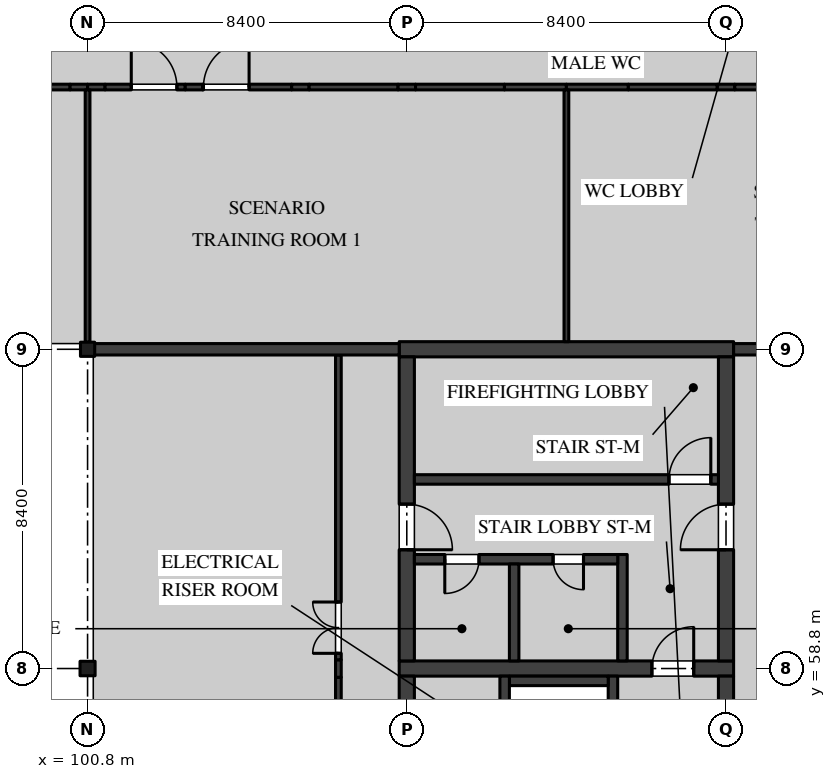
"""IFC4 building model, lengths in metres.
Left out: names, types, materials, properties, quantities, classifications, styles, units other than length and angle.
Written with IfcOpenShell. Run it as: python <this file> out.ifc"""

import sys

from ifc_helpers import new_model, si_unit, direction, frame, frame_2d, origin, origin_2d, place, context, subcontext, project, spatial, rectangle, i_section, extrude, element, fill, save


model = new_model("IFC4")
c1 = context("Model", 3, precision=1e-05, world=origin(), true_north=direction((0.0, 1.0)))
c2 = subcontext(c1, "Body", "Model", "MODEL_VIEW")
j1 = project(units=[si_unit("LENGTHUNIT", "METRE"), si_unit("PLANEANGLEUNIT", "RADIAN")], contexts=[c1])
p1 = place(None, origin())
s1 = spatial("IfcSite", under=j1, at=p1, CompositionType="ELEMENT")
p2 = place(p1, origin())
s2 = spatial("IfcBuilding", under=s1, at=p2, CompositionType="ELEMENT")
p3 = place(p2, frame((0.0, 0.0, 14.4)))
s3 = spatial("IfcBuildingStorey", under=s2, at=p3, CompositionType="ELEMENT", Elevation=14.4)
p4 = place(p3, frame((100.8, 58.8, 0.0), z_axis=(0.0, 0.0, 1.0), x_axis=(1.0, 0.0, 0.0)))
e1 = element("IfcColumn", 1, at=p4, inside=s3, PredefinedType="COLUMN", context=c2, shape_type="SweptSolid", body=[
    extrude(i_section(OverallWidth=0.396, OverallDepth=0.381, WebThickness=0.019, FlangeThickness=0.03, FilletRadius=0.015, at=origin_2d()), origin(), (0.0, 0.0, 1.0), 4.37),
])
p5 = place(p3, frame((100.8, 67.2, 0.0), z_axis=(0.0, 0.0, 1.0), x_axis=(1.0, 0.0, 0.0)))
e2 = element("IfcColumn", 2, at=p5, inside=s3, PredefinedType="COLUMN", context=c2, shape_type="SweptSolid", body=[
    extrude(i_section(OverallWidth=0.373, OverallDepth=0.373, WebThickness=0.016, FlangeThickness=0.026, FilletRadius=0.015, at=origin_2d()), origin(), (0.0, 0.0, 1.0), 4.37),
])
p6 = place(p3, frame((109.0, 58.8, 0.0), z_axis=(0.0, 0.0, 1.0), x_axis=(1.0, 0.0, 0.0)))
e3 = element("IfcWall", 3, at=p6, inside=s3, PredefinedType="SHEAR", context=c2, shape_type="SweptSolid", body=[
    extrude(rectangle(XDim=8.8, YDim=0.4, at=frame_2d((4.4, 0.0))), origin(), (0.0, 0.0, 1.0), 4.37),
])
p7 = place(p6, frame((6.65, 0.0, 0.0)))
e4 = element("IfcOpeningElement", 4, at=p7, cuts=e3, PredefinedType="OPENING", context=c2, shape_type="SweptSolid", body=[
    extrude(rectangle(XDim=1.1, YDim=2.1, at=frame_2d((0.55, 1.05))), frame((0.0, 0.21, 0.0), z_axis=(0.0, -1.0, 0.0), x_axis=(1.0, 0.0, 0.0)), (0.0, 0.0, 1.0), 0.42),
])
p8 = place(p3, frame((109.2, 50.6, 0.0), z_axis=(0.0, 0.0, 1.0), x_axis=(0.0, 1.0, 0.0)))
e5 = element("IfcWall", 5, at=p8, inside=s3, PredefinedType="SHEAR", context=c2, shape_type="SweptSolid", body=[
    extrude(rectangle(XDim=8.0, YDim=0.4, at=frame_2d((4.0, 0.0))), origin(), (0.0, 0.0, 1.0), 4.37),
])
p9 = place(p8, frame((3.25, 0.0, 0.0)))
e6 = element("IfcOpeningElement", 6, at=p9, cuts=e5, PredefinedType="OPENING", context=c2, shape_type="SweptSolid", body=[
    extrude(rectangle(XDim=1.2, YDim=2.1, at=frame_2d((0.6, 1.05))), frame((0.0, 0.21, 0.0), z_axis=(0.0, -1.0, 0.0), x_axis=(1.0, 0.0, 0.0)), (0.0, 0.0, 1.0), 0.42),
])
p10 = place(p3, frame((117.6, 50.6, 0.0), z_axis=(0.0, 0.0, 1.0), x_axis=(0.0, 1.0, 0.0)))
e7 = element("IfcWall", 7, at=p10, inside=s3, PredefinedType="SHEAR", context=c2, shape_type="SweptSolid", body=[
    extrude(rectangle(XDim=8.0, YDim=0.4, at=frame_2d((4.0, 0.0))), origin(), (0.0, 0.0, 1.0), 4.37),
])
p11 = place(p10, frame((3.25, 0.0, 0.0)))
e8 = element("IfcOpeningElement", 8, at=p11, cuts=e7, PredefinedType="OPENING", context=c2, shape_type="SweptSolid", body=[
    extrude(rectangle(XDim=1.2, YDim=2.1, at=frame_2d((0.6, 1.05))), frame((0.0, 0.21, 0.0), z_axis=(0.0, -1.0, 0.0), x_axis=(1.0, 0.0, 0.0)), (0.0, 0.0, 1.0), 0.42),
])
p12 = place(p10, frame((6.0, 0.0, 0.0)))
e9 = element("IfcOpeningElement", 9, at=p12, cuts=e7, PredefinedType="OPENING", context=c2, shape_type="SweptSolid", body=[
    extrude(rectangle(XDim=1.2, YDim=2.1, at=frame_2d((0.6, 1.05))), frame((0.0, 0.21, 0.0), z_axis=(0.0, -1.0, 0.0), x_axis=(1.0, 0.0, 0.0)), (0.0, 0.0, 1.0), 0.42),
])
p13 = place(p3, frame((109.0, 67.2, 0.0), z_axis=(0.0, 0.0, 1.0), x_axis=(1.0, 0.0, 0.0)))
e10 = element("IfcWall", 10, at=p13, inside=s3, PredefinedType="SHEAR", context=c2, shape_type="SweptSolid", body=[
    extrude(rectangle(XDim=8.8, YDim=0.4, at=frame_2d((4.4, 0.0))), origin(), (0.0, 0.0, 1.0), 4.37),
])
p14 = place(p3, frame((109.2, 59.0, 0.0), z_axis=(0.0, 0.0, 1.0), x_axis=(0.0, 1.0, 0.0)))
e11 = element("IfcWall", 11, at=p14, inside=s3, PredefinedType="SHEAR", context=c2, shape_type="SweptSolid", body=[
    extrude(rectangle(XDim=8.0, YDim=0.4, at=frame_2d((4.0, 0.0))), origin(), (0.0, 0.0, 1.0), 4.37),
])
p15 = place(p14, frame((2.925, 0.0, 0.0)))
e12 = element("IfcOpeningElement", 12, at=p15, cuts=e11, PredefinedType="OPENING", context=c2, shape_type="SweptSolid", body=[
    extrude(rectangle(XDim=1.2, YDim=2.1, at=frame_2d((0.6, 1.05))), frame((0.0, 0.21, 0.0), z_axis=(0.0, -1.0, 0.0), x_axis=(1.0, 0.0, 0.0)), (0.0, 0.0, 1.0), 0.42),
])
p16 = place(p3, frame((117.6, 59.0, 0.0), z_axis=(0.0, 0.0, 1.0), x_axis=(0.0, 1.0, 0.0)))
e13 = element("IfcWall", 13, at=p16, inside=s3, PredefinedType="SHEAR", context=c2, shape_type="SweptSolid", body=[
    extrude(rectangle(XDim=8.0, YDim=0.4, at=frame_2d((4.0, 0.0))), origin(), (0.0, 0.0, 1.0), 4.37),
])
p17 = place(p16, frame((2.925, 0.0, 0.0)))
e14 = element("IfcOpeningElement", 14, at=p17, cuts=e13, PredefinedType="OPENING", context=c2, shape_type="SweptSolid", body=[
    extrude(rectangle(XDim=1.2, YDim=2.1, at=frame_2d((0.6, 1.05))), frame((0.0, 0.21, 0.0), z_axis=(0.0, -1.0, 0.0), x_axis=(1.0, 0.0, 0.0)), (0.0, 0.0, 1.0), 0.42),
])
p18 = place(p3, frame((117.4, 63.775, 0.0), z_axis=(0.0, 0.0, 1.0), x_axis=(-1.0, 0.0, 0.0)))
e15 = element("IfcWall", 15, at=p18, inside=s3, PredefinedType="SOLIDWALL", context=c2, shape_type="SweptSolid", body=[
    extrude(rectangle(XDim=8.0, YDim=0.25, at=frame_2d((4.0, 0.0))), origin(), (0.0, 0.0, 1.0), 4.37),
])
p19 = place(p18, frame((0.2, 0.0, 0.0)))
e16 = element("IfcOpeningElement", 16, at=p19, cuts=e15, PredefinedType="OPENING", context=c2, shape_type="SweptSolid", body=[
    extrude(rectangle(XDim=1.1, YDim=2.1, at=frame_2d((0.55, 1.05))), frame((0.0, 0.135, 0.0), z_axis=(0.0, -1.0, 0.0), x_axis=(1.0, 0.0, 0.0)), (0.0, 0.0, 1.0), 0.27),
])
p20 = place(p3, frame((114.875, 61.8, 0.0), z_axis=(0.0, 0.0, 1.0), x_axis=(0.0, -1.0, 0.0)))
e17 = element("IfcWall", 17, at=p20, inside=s3, PredefinedType="SOLIDWALL", context=c2, shape_type="SweptSolid", body=[
    extrude(rectangle(XDim=2.8, YDim=0.25, at=frame_2d((1.4, 0.0))), origin(), (0.0, 0.0, 1.0), 4.37),
])
p21 = place(p3, frame((114.75, 61.675, 0.0), z_axis=(0.0, 0.0, 1.0), x_axis=(-1.0, 0.0, 0.0)))
e18 = element("IfcWall", 18, at=p21, inside=s3, PredefinedType="SOLIDWALL", context=c2, shape_type="SweptSolid", body=[
    extrude(rectangle(XDim=5.35, YDim=0.25, at=frame_2d((2.675, 0.0))), origin(), (0.0, 0.0, 1.0), 4.37),
])
p22 = place(p21, frame((3.65, 0.0, 0.0)))
e19 = element("IfcOpeningElement", 19, at=p22, cuts=e18, PredefinedType="OPENING", context=c2, shape_type="SweptSolid", body=[
    extrude(rectangle(XDim=0.9, YDim=2.1, at=frame_2d((0.45, 1.05))), frame((0.0, 0.135, 0.0), z_axis=(0.0, -1.0, 0.0), x_axis=(1.0, 0.0, 0.0)), (0.0, 0.0, 1.0), 0.27),
])
p23 = place(p21, frame((0.9, 0.0, 0.0)))
e20 = element("IfcOpeningElement", 20, at=p23, cuts=e18, PredefinedType="OPENING", context=c2, shape_type="SweptSolid", body=[
    extrude(rectangle(XDim=0.8, YDim=2.1, at=frame_2d((0.4, 1.05))), frame((0.0, 0.135, 0.0), z_axis=(0.0, -1.0, 0.0), x_axis=(1.0, 0.0, 0.0)), (0.0, 0.0, 1.0), 0.27),
])
p24 = place(p3, frame((112.025, 61.55, 0.0), z_axis=(0.0, 0.0, 1.0), x_axis=(0.0, -1.0, 0.0)))
e21 = element("IfcWall", 21, at=p24, inside=s3, PredefinedType="SOLIDWALL", context=c2, shape_type="SweptSolid", body=[
    extrude(rectangle(XDim=2.55, YDim=0.25, at=frame_2d((1.275, 0.0))), origin(), (0.0, 0.0, 1.0), 4.37),
])
p25 = place(p3, frame((114.625, 55.5, 0.0), z_axis=(0.0, 0.0, 1.0), x_axis=(0.0, 1.0, 0.0)))
e22 = element("IfcWall", 22, at=p25, inside=s3, PredefinedType="SOLIDWALL", context=c2, shape_type="SweptSolid", body=[
    extrude(rectangle(XDim=3.1, YDim=0.25, at=frame_2d((1.55, 0.0))), origin(), (0.0, 0.0, 1.0), 4.37),
])
p26 = place(p25, frame((1.0, 0.0, 0.0)))
e23 = element("IfcOpeningElement", 23, at=p26, cuts=e22, PredefinedType="OPENING", context=c2, shape_type="SweptSolid", body=[
    extrude(rectangle(XDim=1.1, YDim=2.1, at=frame_2d((0.55, 1.05))), frame((0.0, 0.135, 0.0), z_axis=(0.0, -1.0, 0.0), x_axis=(1.0, 0.0, 0.0)), (0.0, 0.0, 1.0), 0.27),
])
p27 = place(p3, frame((111.9, 58.475, 0.0), z_axis=(0.0, 0.0, 1.0), x_axis=(1.0, 0.0, 0.0)))
e24 = element("IfcWall", 24, at=p27, inside=s3, PredefinedType="SOLIDWALL", context=c2, shape_type="SweptSolid", body=[
    extrude(rectangle(XDim=2.6, YDim=0.25, at=frame_2d((1.3, 0.0))), origin(), (0.0, 0.0, 1.0), 4.37),
])
p28 = place(p3, frame((111.775, 55.5, 0.0), z_axis=(0.0, 0.0, 1.0), x_axis=(0.0, 1.0, 0.0)))
e25 = element("IfcWall", 25, at=p28, inside=s3, PredefinedType="SOLIDWALL", context=c2, shape_type="SweptSolid", body=[
    extrude(rectangle(XDim=3.1, YDim=0.25, at=frame_2d((1.55, 0.0))), origin(), (0.0, 0.0, 1.0), 4.37),
])
p29 = place(p3, frame((107.4, 50.86, 0.0), z_axis=(0.0, 0.0, 1.0), x_axis=(0.0, 1.0, 0.0)))
e26 = element("IfcWall", 26, at=p29, inside=s3, PredefinedType="PARTITIONING", context=c2, shape_type="SweptSolid", body=[
    extrude(rectangle(XDim=7.71, YDim=0.15, at=frame_2d((3.855, 0.0))), origin(), (0.0, 0.0, 1.0), 4.37),
])
p30 = place(p3, frame((107.4, 58.57, 0.0), z_axis=(0.0, 0.0, 1.0), x_axis=(0.0, 1.0, 0.0)))
e27 = element("IfcWall", 27, at=p30, inside=s3, PredefinedType="PARTITIONING", context=c2, shape_type="SweptSolid", body=[
    extrude(rectangle(XDim=0.46, YDim=0.15, at=frame_2d((0.23, 0.0))), origin(), (0.0, 0.0, 1.0), 3.746),
])
p31 = place(p3, frame((107.4, 59.03, 0.0), z_axis=(0.0, 0.0, 1.0), x_axis=(0.0, 1.0, 0.0)))
e28 = element("IfcWall", 28, at=p31, inside=s3, PredefinedType="PARTITIONING", context=c2, shape_type="SweptSolid", body=[
    extrude(rectangle(XDim=8.02, YDim=0.15, at=frame_2d((4.01, 0.0))), origin(), (0.0, 0.0, 1.0), 4.37),
])
p32 = place(p31, frame((0.17, 0.0, 0.0)))
e29 = element("IfcOpeningElement", 29, at=p32, cuts=e28, PredefinedType="OPENING", context=c2, shape_type="SweptSolid", body=[
    extrude(rectangle(XDim=1.35, YDim=2.1, at=frame_2d((0.675, 1.05))), frame((0.0, 0.085, 0.0), z_axis=(0.0, -1.0, 0.0), x_axis=(1.0, 0.0, 0.0)), (0.0, 0.0, 1.0), 0.17),
])
p33 = place(p3, frame((98.23, 74.1, 0.0), z_axis=(0.0, 0.0, 1.0), x_axis=(1.0, 0.0, 0.0)))
e30 = element("IfcWall", 30, at=p33, inside=s3, PredefinedType="PARTITIONING", context=c2, shape_type="SweptSolid", body=[
    extrude(rectangle(XDim=2.11, YDim=0.15, at=frame_2d((1.055, 0.0))), origin(), (0.0, 0.0, 1.0), 4.37),
])
for number, where, z_axis, x_axis in (
    (31, (100.34, 74.1, 0.0), (0.0, 0.0, 1.0), (1.0, 0.0, 0.0)),
    (32, (100.8, 74.1, 0.0), (0.0, 0.0, 1.0), (1.0, 0.0, 0.0)),
):
    element("IfcWall", number, at=place(p3, frame(where, z_axis=z_axis, x_axis=x_axis)), inside=s3, PredefinedType="PARTITIONING", context=c2, shape_type="SweptSolid", body=[
        extrude(rectangle(XDim=0.46, YDim=0.15, at=frame_2d((0.23, 0.0))), origin(), (0.0, 0.0, 1.0), 3.746),
    ])
p34 = place(p3, frame((101.26, 74.1, 0.0), z_axis=(0.0, 0.0, 1.0), x_axis=(1.0, 0.0, 0.0)))
e33 = element("IfcWall", 33, at=p34, inside=s3, PredefinedType="PARTITIONING", context=c2, shape_type="SweptSolid", body=[
    extrude(rectangle(XDim=2.11, YDim=0.15, at=frame_2d((1.055, 0.0))), origin(), (0.0, 0.0, 1.0), 4.37),
])
p35 = place(p34, frame((0.69, 0.0, 0.0)))
e34 = element("IfcOpeningElement", 34, at=p35, cuts=e33, PredefinedType="OPENING", context=c2, shape_type="SweptSolid", body=[
    extrude(rectangle(XDim=1.2, YDim=2.4, at=frame_2d((0.6, 1.2))), frame((0.0, 0.085, 0.0), z_axis=(0.0, -1.0, 0.0), x_axis=(1.0, 0.0, 0.0)), (0.0, 0.0, 1.0), 0.17),
])
p36 = place(p3, frame((103.37, 74.1, 0.0), z_axis=(0.0, 0.0, 1.0), x_axis=(1.0, 0.0, 0.0)))
e35 = element("IfcWall", 35, at=p36, inside=s3, PredefinedType="PARTITIONING", context=c2, shape_type="SweptSolid", body=[
    extrude(rectangle(XDim=0.46, YDim=0.15, at=frame_2d((0.23, 0.0))), origin(), (0.0, 0.0, 1.0), 3.895),
])
p37 = place(p3, frame((103.83, 74.1, 0.0), z_axis=(0.0, 0.0, 1.0), x_axis=(1.0, 0.0, 0.0)))
e36 = element("IfcWall", 36, at=p37, inside=s3, PredefinedType="PARTITIONING", context=c2, shape_type="SweptSolid", body=[
    extrude(rectangle(XDim=2.34, YDim=0.15, at=frame_2d((1.17, 0.0))), origin(), (0.0, 0.0, 1.0), 4.37),
])
p38 = place(p37, frame((0.02, 0.0, 0.0)))
e37 = element("IfcOpeningElement", 37, at=p38, cuts=e36, PredefinedType="OPENING", context=c2, shape_type="SweptSolid", body=[
    extrude(rectangle(XDim=1.2, YDim=2.4, at=frame_2d((0.6, 1.2))), frame((0.0, 0.085, 0.0), z_axis=(0.0, -1.0, 0.0), x_axis=(1.0, 0.0, 0.0)), (0.0, 0.0, 1.0), 0.17),
])
p39 = place(p3, frame((106.17, 74.1, 0.0), z_axis=(0.0, 0.0, 1.0), x_axis=(1.0, 0.0, 0.0)))
e38 = element("IfcWall", 38, at=p39, inside=s3, PredefinedType="PARTITIONING", context=c2, shape_type="SweptSolid", body=[
    extrude(rectangle(XDim=0.46, YDim=0.15, at=frame_2d((0.23, 0.0))), origin(), (0.0, 0.0, 1.0), 3.895),
])
p40 = place(p3, frame((106.63, 74.1, 0.0), z_axis=(0.0, 0.0, 1.0), x_axis=(1.0, 0.0, 0.0)))
e39 = element("IfcWall", 39, at=p40, inside=s3, PredefinedType="PARTITIONING", context=c2, shape_type="SweptSolid", body=[
    extrude(rectangle(XDim=2.34, YDim=0.15, at=frame_2d((1.17, 0.0))), origin(), (0.0, 0.0, 1.0), 4.37),
])
p41 = place(p3, frame((108.97, 74.1, 0.0), z_axis=(0.0, 0.0, 1.0), x_axis=(1.0, 0.0, 0.0)))
e40 = element("IfcWall", 40, at=p41, inside=s3, PredefinedType="PARTITIONING", context=c2, shape_type="SweptSolid", body=[
    extrude(rectangle(XDim=0.46, YDim=0.15, at=frame_2d((0.23, 0.0))), origin(), (0.0, 0.0, 1.0), 3.746),
])
p42 = place(p3, frame((109.43, 74.1, 0.0), z_axis=(0.0, 0.0, 1.0), x_axis=(1.0, 0.0, 0.0)))
e41 = element("IfcWall", 41, at=p42, inside=s3, PredefinedType="PARTITIONING", context=c2, shape_type="SweptSolid", body=[
    extrude(rectangle(XDim=2.34, YDim=0.15, at=frame_2d((1.17, 0.0))), origin(), (0.0, 0.0, 1.0), 4.37),
])
p43 = place(p3, frame((111.77, 74.1, 0.0), z_axis=(0.0, 0.0, 1.0), x_axis=(1.0, 0.0, 0.0)))
e42 = element("IfcWall", 42, at=p43, inside=s3, PredefinedType="PARTITIONING", context=c2, shape_type="SweptSolid", body=[
    extrude(rectangle(XDim=1.63, YDim=0.15, at=frame_2d((0.815, 0.0))), origin(), (0.0, 0.0, 1.0), 3.895),
])
p44 = place(p3, frame((113.4, 74.1, 0.0), z_axis=(0.0, 0.0, 1.0), x_axis=(1.0, 0.0, 0.0)))
e43 = element("IfcWall", 43, at=p44, inside=s3, PredefinedType="PARTITIONING", context=c2, shape_type="SweptSolid", body=[
    extrude(rectangle(XDim=1.63, YDim=0.15, at=frame_2d((0.815, 0.0))), origin(), (0.0, 0.0, 1.0), 3.895),
])
p45 = place(p3, frame((115.03, 74.1, 0.0), z_axis=(0.0, 0.0, 1.0), x_axis=(1.0, 0.0, 0.0)))
e44 = element("IfcWall", 44, at=p45, inside=s3, PredefinedType="PARTITIONING", context=c2, shape_type="SweptSolid", body=[
    extrude(rectangle(XDim=2.34, YDim=0.15, at=frame_2d((1.17, 0.0))), origin(), (0.0, 0.0, 1.0), 4.37),
])
p46 = place(p3, frame((117.37, 74.1, 0.0), z_axis=(0.0, 0.0, 1.0), x_axis=(1.0, 0.0, 0.0)))
e45 = element("IfcWall", 45, at=p46, inside=s3, PredefinedType="PARTITIONING", context=c2, shape_type="SweptSolid", body=[
    extrude(rectangle(XDim=0.46, YDim=0.15, at=frame_2d((0.23, 0.0))), origin(), (0.0, 0.0, 1.0), 3.746),
])
p47 = place(p3, frame((117.83, 74.1, 0.0), z_axis=(0.0, 0.0, 1.0), x_axis=(1.0, 0.0, 0.0)))
e46 = element("IfcWall", 46, at=p47, inside=s3, PredefinedType="PARTITIONING", context=c2, shape_type="SweptSolid", body=[
    extrude(rectangle(XDim=2.34, YDim=0.15, at=frame_2d((1.17, 0.0))), origin(), (0.0, 0.0, 1.0), 4.37),
])
p48 = place(p3, frame((100.8, 67.386, 0.0), z_axis=(0.0, 0.0, 1.0), x_axis=(0.0, 1.0, 0.0)))
e47 = element("IfcWall", 47, at=p48, inside=s3, PredefinedType="PARTITIONING", context=c2, shape_type="SweptSolid", body=[
    extrude(rectangle(XDim=6.639, YDim=0.125, at=frame_2d((3.319, 0.0))), origin(), (0.0, 0.0, 1.0), 3.746),
])
p49 = place(p3, frame((113.4, 67.4, 0.0), z_axis=(0.0, 0.0, 1.0), x_axis=(0.0, 1.0, 0.0)))
e48 = element("IfcWall", 48, at=p49, inside=s3, PredefinedType="PARTITIONING", context=c2, shape_type="SweptSolid", body=[
    extrude(rectangle(XDim=6.625, YDim=0.125, at=frame_2d((3.312, 0.0))), origin(), (0.0, 0.0, 1.0), 4.37),
])
for number, where, z_axis, x_axis in (
    (49, (125.998, 67.2, 0.0), (0.0, 0.0, 1.0), (-1.0, 0.0, 0.0)),
    (50, (109.0, 67.2, 0.0), (0.0, 0.0, 1.0), (-1.0, 0.0, 0.0)),
):
    element("IfcWall", number, at=place(p3, frame(where, z_axis=z_axis, x_axis=x_axis)), inside=s3, PredefinedType="SOLIDWALL", context=c2, shape_type="SweptSolid", body=[
        extrude(rectangle(XDim=8.198, YDim=0.3, at=frame_2d((4.099, 0.0))), origin(), (0.0, 0.0, 1.0), 3.746),
    ])
p50 = place(p7, origin())
e51 = element("IfcDoor", 51, at=p50, inside=s3, OperationType="SINGLE_SWING_LEFT", PredefinedType="DOOR", context=c2, shape_type="SweptSolid", body=[
    extrude(rectangle(XDim=1.1, YDim=2.1, at=frame_2d((0.55, 1.05))), frame((0.0, 0.035, 0.0), z_axis=(0.0, -1.0, 0.0), x_axis=(1.0, 0.0, 0.0)), (0.0, 0.0, 1.0), 0.07),
])
fill(e4, e51)
p51 = place(p22, origin())
e52 = element("IfcDoor", 52, at=p51, inside=s3, OperationType="SINGLE_SWING_LEFT", PredefinedType="DOOR", context=c2, shape_type="SweptSolid", body=[
    extrude(rectangle(XDim=0.9, YDim=2.1, at=frame_2d((0.45, 1.05))), frame((0.0, 0.035, 0.0), z_axis=(0.0, -1.0, 0.0), x_axis=(1.0, 0.0, 0.0)), (0.0, 0.0, 1.0), 0.07),
])
fill(e19, e52)
p52 = place(p15, frame((1.2, 0.0, 0.0), z_axis=(0.0, 0.0, 1.0), x_axis=(-1.0, 0.0, 0.0)))
e53 = element("IfcDoor", 53, at=p52, inside=s3, OperationType="SINGLE_SWING_LEFT", PredefinedType="DOOR", context=c2, shape_type="SweptSolid", body=[
    extrude(rectangle(XDim=1.2, YDim=2.1, at=frame_2d((0.6, 1.05))), frame((0.0, 0.035, 0.0), z_axis=(0.0, -1.0, 0.0), x_axis=(1.0, 0.0, 0.0)), (0.0, 0.0, 1.0), 0.07),
])
fill(e12, e53)
p53 = place(p17, origin())
e54 = element("IfcDoor", 54, at=p53, inside=s3, OperationType="SINGLE_SWING_RIGHT", PredefinedType="DOOR", context=c2, shape_type="SweptSolid", body=[
    extrude(rectangle(XDim=1.2, YDim=2.1, at=frame_2d((0.6, 1.05))), frame((0.0, 0.035, 0.0), z_axis=(0.0, -1.0, 0.0), x_axis=(1.0, 0.0, 0.0)), (0.0, 0.0, 1.0), 0.07),
])
fill(e14, e54)
p54 = place(p23, origin())
e55 = element("IfcDoor", 55, at=p54, inside=s3, OperationType="SINGLE_SWING_RIGHT", PredefinedType="DOOR", context=c2, shape_type="SweptSolid", body=[
    extrude(rectangle(XDim=0.8, YDim=2.1, at=frame_2d((0.4, 1.05))), frame((0.0, 0.035, 0.0), z_axis=(0.0, -1.0, 0.0), x_axis=(1.0, 0.0, 0.0)), (0.0, 0.0, 1.0), 0.07),
])
fill(e20, e55)
p55 = place(p19, frame((1.1, 0.0, 0.0), z_axis=(0.0, 0.0, 1.0), x_axis=(-1.0, 0.0, 0.0)))
e56 = element("IfcDoor", 56, at=p55, inside=s3, OperationType="SINGLE_SWING_LEFT", PredefinedType="DOOR", context=c2, shape_type="SweptSolid", body=[
    extrude(rectangle(XDim=1.1, YDim=2.1, at=frame_2d((0.55, 1.05))), frame((0.0, 0.035, 0.0), z_axis=(0.0, -1.0, 0.0), x_axis=(1.0, 0.0, 0.0)), (0.0, 0.0, 1.0), 0.07),
])
fill(e16, e56)
p56 = place(p32, origin())
e57 = element("IfcDoor", 57, at=p56, inside=s3, OperationType="DOUBLE_DOOR_SINGLE_SWING", PredefinedType="DOOR", context=c2, shape_type="SweptSolid", body=[
    extrude(rectangle(XDim=1.35, YDim=2.1, at=frame_2d((0.675, 1.05))), frame((0.0, 0.025, 0.0), z_axis=(0.0, -1.0, 0.0), x_axis=(1.0, 0.0, 0.0)), (0.0, 0.0, 1.0), 0.05),
])
fill(e29, e57)
p57 = place(p35, origin())
e58 = element("IfcDoor", 58, at=p57, inside=s3, OperationType="SINGLE_SWING_RIGHT", PredefinedType="DOOR", context=c2, shape_type="SweptSolid", body=[
    extrude(rectangle(XDim=1.2, YDim=2.4, at=frame_2d((0.6, 1.2))), frame((0.0, 0.025, 0.0), z_axis=(0.0, -1.0, 0.0), x_axis=(1.0, 0.0, 0.0)), (0.0, 0.0, 1.0), 0.05),
])
fill(e34, e58)
p58 = place(p38, origin())
e59 = element("IfcDoor", 59, at=p58, inside=s3, OperationType="SINGLE_SWING_LEFT", PredefinedType="DOOR", context=c2, shape_type="SweptSolid", body=[
    extrude(rectangle(XDim=1.2, YDim=2.4, at=frame_2d((0.6, 1.2))), frame((0.0, 0.025, 0.0), z_axis=(0.0, -1.0, 0.0), x_axis=(1.0, 0.0, 0.0)), (0.0, 0.0, 1.0), 0.05),
])
fill(e37, e59)
save(model, sys.argv[1])
